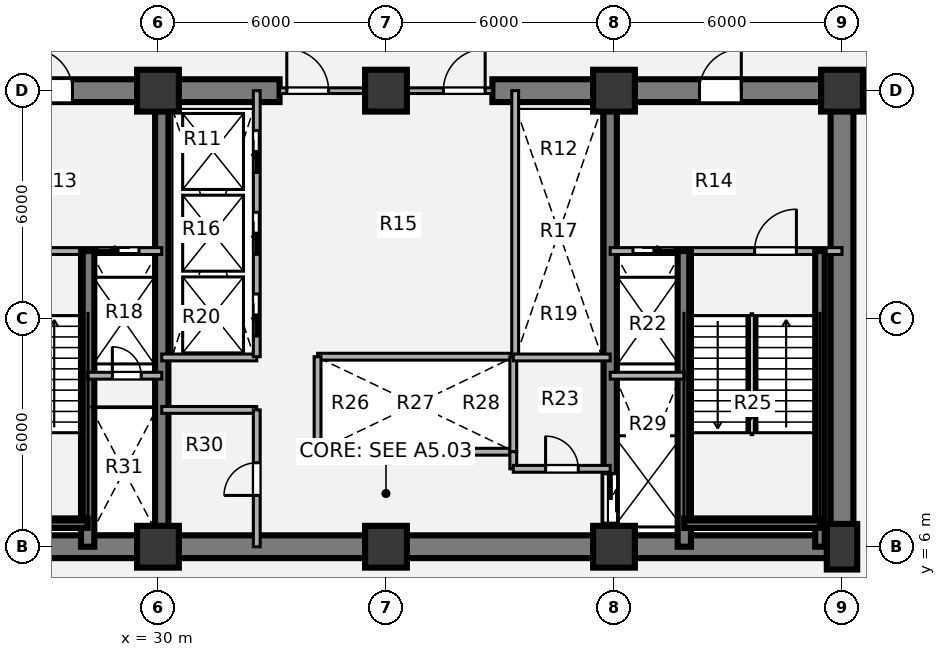
"""IFC4 building model, lengths in metres.
Left out: names, types, materials, properties, quantities, classifications, styles, units other than length and angle.
Written with IfcOpenShell. Run it as: python <this file> out.ifc"""

import sys

from ifc_helpers import new_model, si_unit, direction, frame, frame_2d, origin, origin_2d, place, context, subcontext, project, spatial, rectangle, extrude, source, transform, mapped, element, fill, save


model = new_model("IFC4")
c1 = context("Model", 3, precision=1e-05, world=origin(), true_north=direction((0.0, 1.0)))
c2 = subcontext(c1, "Body", "Model", "MODEL_VIEW")
j1 = project(units=[si_unit("LENGTHUNIT", "METRE"), si_unit("PLANEANGLEUNIT", "RADIAN")], contexts=[c1])
p1 = place(None, origin())
s1 = spatial("IfcSite", under=j1, at=p1, CompositionType="ELEMENT")
p2 = place(p1, origin())
s2 = spatial("IfcBuilding", under=s1, at=p2, CompositionType="ELEMENT")
p3 = place(p2, frame((0.0, 0.0, 14.04)))
s3 = spatial("IfcBuildingStorey", under=s2, at=p3, CompositionType="ELEMENT", Elevation=14.04)
m1 = source(origin(), c2, "Body", "SweptSolid", [
    extrude(rectangle(XDim=1.1, YDim=1.1, at=origin_2d()), origin(), (0.0, 0.0, 1.0), 4.32),
])
for number, where, z_axis, x_axis in (
    (1, (30.0, 6.0, 0.0), (0.0, 0.0, 1.0), (1.0, 0.0, 0.0)),
    (2, (36.0, 6.0, 0.0), (0.0, 0.0, 1.0), (1.0, 0.0, 0.0)),
    (3, (42.0, 6.0, 0.0), (0.0, 0.0, 1.0), (1.0, 0.0, 0.0)),
):
    element("IfcColumn", number, at=place(p3, frame(where, z_axis=z_axis, x_axis=x_axis)), inside=s3, PredefinedType="COLUMN", context=c2, shape_type="MappedRepresentation", body=[
        mapped(m1, transform((0.0, 0.0, 0.0), x_axis=(1.0, 0.0, 0.0), y_axis=(0.0, 1.0, 0.0), z_axis=(0.0, 0.0, 1.0), scale=1.0)),
    ])
m2 = source(origin(), c2, "Body", "SweptSolid", [
    extrude(rectangle(XDim=0.8, YDim=1.2, at=origin_2d()), origin(), (0.0, 0.0, 1.0), 4.32),
])
p4 = place(p3, frame((48.0, 6.0, 0.0), z_axis=(0.0, 0.0, 1.0), x_axis=(1.0, 0.0, 0.0)))
e4 = element("IfcColumn", 4, at=p4, inside=s3, PredefinedType="COLUMN", context=c2, shape_type="MappedRepresentation", body=[
    mapped(m2, transform((0.0, 0.0, 0.0), x_axis=(1.0, 0.0, 0.0), y_axis=(0.0, 1.0, 0.0), z_axis=(0.0, 0.0, 1.0), scale=1.0)),
])
for number, where, z_axis, x_axis in (
    (5, (30.0, 18.0, 0.0), (0.0, 0.0, 1.0), (1.0, 0.0, 0.0)),
    (6, (36.0, 18.0, 0.0), (0.0, 0.0, 1.0), (1.0, 0.0, 0.0)),
    (7, (42.0, 18.0, 0.0), (0.0, 0.0, 1.0), (1.0, 0.0, 0.0)),
    (8, (48.0, 18.0, 0.0), (0.0, 0.0, 1.0), (1.0, 0.0, 0.0)),
):
    element("IfcColumn", number, at=place(p3, frame(where, z_axis=z_axis, x_axis=x_axis)), inside=s3, PredefinedType="COLUMN", context=c2, shape_type="MappedRepresentation", body=[
        mapped(m1, transform((0.0, 0.0, 0.0), x_axis=(1.0, 0.0, 0.0), y_axis=(0.0, 1.0, 0.0), z_axis=(0.0, 0.0, 1.0), scale=1.0)),
    ])
p5 = place(p3, frame((48.3, 6.0, 0.0), z_axis=(0.0, 0.0, 1.0), x_axis=(-1.0, 0.0, 0.0)))
e9 = element("IfcWall", 9, at=p5, inside=s3, PredefinedType="SHEAR", context=c2, shape_type="SweptSolid", body=[
    extrude(rectangle(XDim=24.6, YDim=0.6, at=frame_2d((12.3, 0.0))), origin(), (0.0, 0.0, 1.0), 4.32),
])
p6 = place(p3, frame((48.0, 18.0, 0.0), z_axis=(0.0, 0.0, 1.0), x_axis=(0.0, -1.0, 0.0)))
e10 = element("IfcWall", 10, at=p6, inside=s3, PredefinedType="SHEAR", context=c2, shape_type="SweptSolid", body=[
    extrude(rectangle(XDim=12.0, YDim=0.6, at=frame_2d((6.0, 0.0))), origin(), (0.0, 0.0, 1.0), 4.32),
])
p7 = place(p3, frame((23.7, 18.0, 0.0), z_axis=(0.0, 0.0, 1.0), x_axis=(1.0, 0.0, 0.0)))
e11 = element("IfcWall", 11, at=p7, inside=s3, PredefinedType="SHEAR", context=c2, shape_type="SweptSolid", body=[
    extrude(rectangle(XDim=9.5, YDim=0.6, at=frame_2d((4.75, 0.0))), origin(), (0.0, 0.0, 1.0), 4.32),
])
p8 = place(p7, frame((2.95, 0.0, 0.0)))
e12 = element("IfcOpeningElement", 12, at=p8, cuts=e11, PredefinedType="OPENING", context=c2, shape_type="SweptSolid", body=[
    extrude(rectangle(XDim=1.1, YDim=2.1, at=origin_2d()), frame((0.55, 0.31, 1.05), z_axis=(0.0, -1.0, 0.0), x_axis=(1.0, 0.0, 0.0)), (0.0, 0.0, 1.0), 0.62),
])
p9 = place(p3, frame((38.8, 18.0, 0.0), z_axis=(0.0, 0.0, 1.0), x_axis=(1.0, 0.0, 0.0)))
e13 = element("IfcWall", 13, at=p9, inside=s3, PredefinedType="SHEAR", context=c2, shape_type="SweptSolid", body=[
    extrude(rectangle(XDim=9.5, YDim=0.6, at=frame_2d((4.75, 0.0))), origin(), (0.0, 0.0, 1.0), 4.32),
])
p10 = place(p9, frame((5.45, 0.0, 0.0)))
e14 = element("IfcOpeningElement", 14, at=p10, cuts=e13, PredefinedType="OPENING", context=c2, shape_type="SweptSolid", body=[
    extrude(rectangle(XDim=1.1, YDim=2.1, at=origin_2d()), frame((0.55, 0.31, 1.05), z_axis=(0.0, -1.0, 0.0), x_axis=(1.0, 0.0, 0.0)), (0.0, 0.0, 1.0), 0.62),
])
p11 = place(p3, frame((30.1, 6.0, 0.0), z_axis=(0.0, 0.0, 1.0), x_axis=(0.0, 1.0, 0.0)))
e15 = element("IfcWall", 15, at=p11, inside=s3, PredefinedType="SHEAR", context=c2, shape_type="SweptSolid", body=[
    extrude(rectangle(XDim=12.0, YDim=0.35, at=frame_2d((6.0, 0.0))), origin(), (0.0, 0.0, 1.0), 4.32),
])
p12 = place(p3, frame((41.9, 18.0, 0.0), z_axis=(0.0, 0.0, 1.0), x_axis=(0.0, -1.0, 0.0)))
e16 = element("IfcWall", 16, at=p12, inside=s3, PredefinedType="SHEAR", context=c2, shape_type="SweptSolid", body=[
    extrude(rectangle(XDim=12.0, YDim=0.35, at=frame_2d((6.0, 0.0))), origin(), (0.0, 0.0, 1.0), 4.32),
])
p13 = place(p12, frame((10.08, 0.0, 0.0)))
e17 = element("IfcOpeningElement", 17, at=p13, cuts=e16, PredefinedType="OPENING", context=c2, shape_type="SweptSolid", body=[
    extrude(rectangle(XDim=1.3, YDim=2.1, at=origin_2d()), frame((0.65, 0.185, 1.05), z_axis=(0.0, -1.0, 0.0), x_axis=(1.0, 0.0, 0.0)), (0.0, 0.0, 1.0), 0.37),
])
for number, where, z_axis, x_axis in (
    (18, (34.2, 11.0, 0.0), (0.0, 0.0, 1.0), (1.0, 0.0, 0.0)),
    (19, (34.2, 8.5, 0.0), (0.0, 0.0, 1.0), (1.0, 0.0, 0.0)),
):
    element("IfcWall", number, at=place(p3, frame(where, z_axis=z_axis, x_axis=x_axis)), inside=s3, PredefinedType="PARTITIONING", context=c2, shape_type="SweptSolid", body=[
        extrude(rectangle(XDim=5.15, YDim=0.18, at=frame_2d((2.575, 0.0))), origin(), (0.0, 0.0, 1.0), 4.01),
    ])
for number, where, z_axis, x_axis in (
    (20, (34.2, 8.5, 0.0), (0.0, 0.0, 1.0), (0.0, 1.0, 0.0)),
    (21, (39.35, 8.5, 0.0), (0.0, 0.0, 1.0), (0.0, 1.0, 0.0)),
):
    element("IfcWall", number, at=place(p3, frame(where, z_axis=z_axis, x_axis=x_axis)), inside=s3, PredefinedType="PARTITIONING", context=c2, shape_type="SweptSolid", body=[
        extrude(rectangle(XDim=2.5, YDim=0.18, at=frame_2d((1.25, 0.0))), origin(), (0.0, 0.0, 1.0), 4.01),
    ])
p14 = place(p3, frame((39.4, 11.0, 0.0), z_axis=(0.0, 0.0, 1.0), x_axis=(0.0, 1.0, 0.0)))
e22 = element("IfcWall", 22, at=p14, inside=s3, PredefinedType="PARTITIONING", context=c2, shape_type="SweptSolid", body=[
    extrude(rectangle(XDim=7.0, YDim=0.18, at=frame_2d((3.5, 0.0))), origin(), (0.0, 0.0, 1.0), 4.01),
])
for number, where, z_axis, x_axis in (
    (23, (30.1, 10.98, 0.0), (0.0, 0.0, 1.0), (1.0, 0.0, 0.0)),
    (24, (30.1, 9.6, 0.0), (0.0, 0.0, 1.0), (1.0, 0.0, 0.0)),
):
    element("IfcWall", number, at=place(p3, frame(where, z_axis=z_axis, x_axis=x_axis)), inside=s3, PredefinedType="PARTITIONING", context=c2, shape_type="SweptSolid", body=[
        extrude(rectangle(XDim=2.5, YDim=0.18, at=frame_2d((1.25, 0.0))), origin(), (0.0, 0.0, 1.0), 4.01),
    ])
p15 = place(p3, frame((32.6, 6.0, 0.0), z_axis=(0.0, 0.0, 1.0), x_axis=(0.0, 1.0, 0.0)))
e25 = element("IfcWall", 25, at=p15, inside=s3, PredefinedType="PARTITIONING", context=c2, shape_type="SweptSolid", body=[
    extrude(rectangle(XDim=3.6, YDim=0.18, at=frame_2d((1.8, 0.0))), origin(), (0.0, 0.0, 1.0), 4.01),
])
p16 = place(p15, frame((1.35, 0.0, 0.0)))
e26 = element("IfcOpeningElement", 26, at=p16, cuts=e25, PredefinedType="OPENING", context=c2, shape_type="SweptSolid", body=[
    extrude(rectangle(XDim=0.86, YDim=2.1, at=origin_2d()), frame((0.43, 0.1, 1.05), z_axis=(0.0, -1.0, 0.0), x_axis=(1.0, 0.0, 0.0)), (0.0, 0.0, 1.0), 0.2),
])
p17 = place(p3, frame((39.35, 10.98, 0.0), z_axis=(0.0, 0.0, 1.0), x_axis=(1.0, 0.0, 0.0)))
e27 = element("IfcWall", 27, at=p17, inside=s3, PredefinedType="PARTITIONING", context=c2, shape_type="SweptSolid", body=[
    extrude(rectangle(XDim=2.55, YDim=0.18, at=frame_2d((1.275, 0.0))), origin(), (0.0, 0.0, 1.0), 4.01),
])
p18 = place(p3, frame((39.35, 8.05, 0.0), z_axis=(0.0, 0.0, 1.0), x_axis=(0.0, 1.0, 0.0)))
e28 = element("IfcWall", 28, at=p18, inside=s3, PredefinedType="PARTITIONING", context=c2, shape_type="SweptSolid", body=[
    extrude(rectangle(XDim=0.45, YDim=0.18, at=frame_2d((0.225, 0.0))), origin(), (0.0, 0.0, 1.0), 4.01),
])
p19 = place(p3, frame((39.35, 8.05, 0.0), z_axis=(0.0, 0.0, 1.0), x_axis=(1.0, 0.0, 0.0)))
e29 = element("IfcWall", 29, at=p19, inside=s3, PredefinedType="PARTITIONING", context=c2, shape_type="SweptSolid", body=[
    extrude(rectangle(XDim=2.55, YDim=0.18, at=frame_2d((1.275, 0.0))), origin(), (0.0, 0.0, 1.0), 4.01),
])
p20 = place(p19, frame((0.85, 0.0, 0.0)))
e30 = element("IfcOpeningElement", 30, at=p20, cuts=e29, PredefinedType="OPENING", context=c2, shape_type="SweptSolid", body=[
    extrude(rectangle(XDim=0.86, YDim=2.1, at=origin_2d()), frame((0.43, 0.1, 1.05), z_axis=(0.0, -1.0, 0.0), x_axis=(1.0, 0.0, 0.0)), (0.0, 0.0, 1.0), 0.2),
])
p21 = place(p3, frame((33.2, 18.0, 0.0), z_axis=(0.0, 0.0, 1.0), x_axis=(1.0, 0.0, 0.0)))
e31 = element("IfcWall", 31, at=p21, inside=s3, PredefinedType="PARTITIONING", context=c2, shape_type="SweptSolid", body=[
    extrude(rectangle(XDim=5.6, YDim=0.15, at=frame_2d((2.8, 0.0))), origin(), (0.0, 0.0, 1.0), 2.825),
])
p22 = place(p21, frame((0.19, 0.0, 0.0)))
e32 = element("IfcOpeningElement", 32, at=p22, cuts=e31, PredefinedType="OPENING", context=c2, shape_type="SweptSolid", body=[
    extrude(rectangle(XDim=1.1, YDim=2.1, at=origin_2d()), frame((0.55, 0.085, 1.05), z_axis=(0.0, -1.0, 0.0), x_axis=(1.0, 0.0, 0.0)), (0.0, 0.0, 1.0), 0.17),
])
p23 = place(p21, frame((4.31, 0.0, 0.0)))
e33 = element("IfcOpeningElement", 33, at=p23, cuts=e31, PredefinedType="OPENING", context=c2, shape_type="SweptSolid", body=[
    extrude(rectangle(XDim=1.1, YDim=2.1, at=origin_2d()), frame((0.55, 0.085, 1.05), z_axis=(0.0, -1.0, 0.0), x_axis=(1.0, 0.0, 0.0)), (0.0, 0.0, 1.0), 0.17),
])
p24 = place(p3, frame((24.0, 13.78, 0.0), z_axis=(0.0, 0.0, 1.0), x_axis=(1.0, 0.0, 0.0)))
e34 = element("IfcWall", 34, at=p24, inside=s3, PredefinedType="PARTITIONING", context=c2, shape_type="SweptSolid", body=[
    extrude(rectangle(XDim=6.1, YDim=0.18, at=frame_2d((3.05, 0.0))), origin(), (0.0, 0.0, 1.0), 4.01),
])
p25 = place(p24, frame((1.15, 0.0, 0.0)))
e35 = element("IfcOpeningElement", 35, at=p25, cuts=e34, PredefinedType="OPENING", context=c2, shape_type="SweptSolid", body=[
    extrude(rectangle(XDim=1.1, YDim=2.1, at=origin_2d()), frame((0.55, 0.1, 1.05), z_axis=(0.0, -1.0, 0.0), x_axis=(1.0, 0.0, 0.0)), (0.0, 0.0, 1.0), 0.2),
])
p26 = place(p24, frame((4.4, 0.0, 0.0)))
e36 = element("IfcOpeningElement", 36, at=p26, cuts=e34, PredefinedType="OPENING", context=c2, shape_type="SweptSolid", body=[
    extrude(rectangle(XDim=1.1, YDim=2.1, at=origin_2d()), frame((0.55, 0.1, 1.05), z_axis=(0.0, -1.0, 0.0), x_axis=(1.0, 0.0, 0.0)), (0.0, 0.0, 1.0), 0.2),
])
p27 = place(p3, frame((28.15, 6.0, 0.0), z_axis=(0.0, 0.0, 1.0), x_axis=(0.0, 1.0, 0.0)))
e37 = element("IfcWall", 37, at=p27, inside=s3, PredefinedType="SHEAR", context=c2, shape_type="SweptSolid", body=[
    extrude(rectangle(XDim=7.78, YDim=0.35, at=frame_2d((3.89, 0.0))), origin(), (0.0, 0.0, 1.0), 4.36),
])
p28 = place(p3, frame((24.58, 6.62, 0.0), z_axis=(0.0, 0.0, 1.0), x_axis=(1.0, 0.0, 0.0)))
e38 = element("IfcWall", 38, at=p28, inside=s3, PredefinedType="SHEAR", context=c2, shape_type="SweptSolid", body=[
    extrude(rectangle(XDim=3.57, YDim=0.25, at=frame_2d((1.785, 0.0))), origin(), (0.0, 0.0, 1.0), 4.36),
])
p29 = place(p3, frame((28.15, 10.5, 0.0), z_axis=(0.0, 0.0, 1.0), x_axis=(1.0, 0.0, 0.0)))
e39 = element("IfcWall", 39, at=p29, inside=s3, PredefinedType="PARTITIONING", context=c2, shape_type="SweptSolid", body=[
    extrude(rectangle(XDim=1.95, YDim=0.18, at=frame_2d((0.975, 0.0))), origin(), (0.0, 0.0, 1.0), 4.01),
])
p30 = place(p29, frame((0.65, 0.0, 0.0)))
e40 = element("IfcOpeningElement", 40, at=p30, cuts=e39, PredefinedType="OPENING", context=c2, shape_type="SweptSolid", body=[
    extrude(rectangle(XDim=0.76, YDim=2.05, at=origin_2d()), frame((0.38, 0.1, 1.025), z_axis=(0.0, -1.0, 0.0), x_axis=(1.0, 0.0, 0.0)), (0.0, 0.0, 1.0), 0.2),
])
p31 = place(p3, frame((41.9, 13.78, 0.0), z_axis=(0.0, 0.0, 1.0), x_axis=(1.0, 0.0, 0.0)))
e41 = element("IfcWall", 41, at=p31, inside=s3, PredefinedType="PARTITIONING", context=c2, shape_type="SweptSolid", body=[
    extrude(rectangle(XDim=6.1, YDim=0.18, at=frame_2d((3.05, 0.0))), origin(), (0.0, 0.0, 1.0), 4.01),
])
p32 = place(p31, frame((0.6, 0.0, 0.0)))
e42 = element("IfcOpeningElement", 42, at=p32, cuts=e41, PredefinedType="OPENING", context=c2, shape_type="SweptSolid", body=[
    extrude(rectangle(XDim=1.1, YDim=2.1, at=origin_2d()), frame((0.55, 0.1, 1.05), z_axis=(0.0, -1.0, 0.0), x_axis=(1.0, 0.0, 0.0)), (0.0, 0.0, 1.0), 0.2),
])
p33 = place(p31, frame((3.8, 0.0, 0.0)))
e43 = element("IfcOpeningElement", 43, at=p33, cuts=e41, PredefinedType="OPENING", context=c2, shape_type="SweptSolid", body=[
    extrude(rectangle(XDim=1.1, YDim=2.1, at=origin_2d()), frame((0.55, 0.1, 1.05), z_axis=(0.0, -1.0, 0.0), x_axis=(1.0, 0.0, 0.0)), (0.0, 0.0, 1.0), 0.2),
])
p34 = place(p3, frame((43.85, 6.0, 0.0), z_axis=(0.0, 0.0, 1.0), x_axis=(0.0, 1.0, 0.0)))
e44 = element("IfcWall", 44, at=p34, inside=s3, PredefinedType="SHEAR", context=c2, shape_type="SweptSolid", body=[
    extrude(rectangle(XDim=7.78, YDim=0.35, at=frame_2d((3.89, 0.0))), origin(), (0.0, 0.0, 1.0), 4.36),
])
p35 = place(p3, frame((47.42, 6.0, 0.0), z_axis=(0.0, 0.0, 1.0), x_axis=(0.0, 1.0, 0.0)))
e45 = element("IfcWall", 45, at=p35, inside=s3, PredefinedType="SHEAR", context=c2, shape_type="SweptSolid", body=[
    extrude(rectangle(XDim=7.78, YDim=0.25, at=frame_2d((3.89, 0.0))), origin(), (0.0, 0.0, 1.0), 4.36),
])
p36 = place(p3, frame((43.85, 6.62, 0.0), z_axis=(0.0, 0.0, 1.0), x_axis=(1.0, 0.0, 0.0)))
e46 = element("IfcWall", 46, at=p36, inside=s3, PredefinedType="SHEAR", context=c2, shape_type="SweptSolid", body=[
    extrude(rectangle(XDim=3.57, YDim=0.25, at=frame_2d((1.785, 0.0))), origin(), (0.0, 0.0, 1.0), 4.36),
])
p37 = place(p3, frame((41.9, 10.5, 0.0), z_axis=(0.0, 0.0, 1.0), x_axis=(1.0, 0.0, 0.0)))
e47 = element("IfcWall", 47, at=p37, inside=s3, PredefinedType="PARTITIONING", context=c2, shape_type="SweptSolid", body=[
    extrude(rectangle(XDim=1.95, YDim=0.18, at=frame_2d((0.975, 0.0))), origin(), (0.0, 0.0, 1.0), 4.01),
])
p38 = place(p3, frame((32.6, 11.0, 0.0), z_axis=(0.0, 0.0, 1.0), x_axis=(0.0, 1.0, 0.0)))
e48 = element("IfcWall", 48, at=p38, inside=s3, PredefinedType="PARTITIONING", context=c2, shape_type="SweptSolid", body=[
    extrude(rectangle(XDim=7.0, YDim=0.18, at=frame_2d((3.5, 0.0))), origin(), (0.0, 0.0, 1.0), 4.01),
])
p39 = place(p38, frame((0.55, 0.0, 0.0)))
e49 = element("IfcOpeningElement", 49, at=p39, cuts=e48, PredefinedType="OPENING", context=c2, shape_type="SweptSolid", body=[
    extrude(rectangle(XDim=1.1, YDim=2.1, at=origin_2d()), frame((0.55, 0.1, 1.05), z_axis=(0.0, -1.0, 0.0), x_axis=(1.0, 0.0, 0.0)), (0.0, 0.0, 1.0), 0.2),
])
p40 = place(p38, frame((2.7, 0.0, 0.0)))
e50 = element("IfcOpeningElement", 50, at=p40, cuts=e48, PredefinedType="OPENING", context=c2, shape_type="SweptSolid", body=[
    extrude(rectangle(XDim=1.1, YDim=2.1, at=origin_2d()), frame((0.55, 0.1, 1.05), z_axis=(0.0, -1.0, 0.0), x_axis=(1.0, 0.0, 0.0)), (0.0, 0.0, 1.0), 0.2),
])
p41 = place(p38, frame((4.85, 0.0, 0.0)))
e51 = element("IfcOpeningElement", 51, at=p41, cuts=e48, PredefinedType="OPENING", context=c2, shape_type="SweptSolid", body=[
    extrude(rectangle(XDim=1.1, YDim=2.1, at=origin_2d()), frame((0.55, 0.1, 1.05), z_axis=(0.0, -1.0, 0.0), x_axis=(1.0, 0.0, 0.0)), (0.0, 0.0, 1.0), 0.2),
])
m3 = source(origin(), c2, "Body", "SweptSolid", [
    extrude(rectangle(XDim=0.86, YDim=2.1, at=origin_2d()), frame((0.43, 0.025, 1.05), z_axis=(0.0, -1.0, 0.0), x_axis=(1.0, 0.0, 0.0)), (0.0, 0.0, 1.0), 0.05),
])
p42 = place(p16, origin())
e52 = element("IfcDoor", 52, at=p42, inside=s3, OperationType="SINGLE_SWING_LEFT", PredefinedType="DOOR", context=c2, shape_type="MappedRepresentation", body=[
    mapped(m3, transform((0.0, 0.0, 0.0), x_axis=(1.0, 0.0, 0.0), y_axis=(0.0, 1.0, 0.0), z_axis=(0.0, 0.0, 1.0), scale=1.0)),
])
fill(e26, e52)
p43 = place(p20, origin())
e53 = element("IfcDoor", 53, at=p43, inside=s3, OperationType="SINGLE_SWING_LEFT", PredefinedType="DOOR", context=c2, shape_type="MappedRepresentation", body=[
    mapped(m3, transform((0.0, 0.0, 0.0), x_axis=(1.0, 0.0, 0.0), y_axis=(0.0, 1.0, 0.0), z_axis=(0.0, 0.0, 1.0), scale=1.0)),
])
fill(e30, e53)
m4 = source(origin(), c2, "Body", "SweptSolid", [
    extrude(rectangle(XDim=1.1, YDim=2.1, at=origin_2d()), frame((0.55, 0.025, 1.05), z_axis=(0.0, -1.0, 0.0), x_axis=(1.0, 0.0, 0.0)), (0.0, 0.0, 1.0), 0.05),
])
p44 = place(p22, origin())
e54 = element("IfcDoor", 54, at=p44, inside=s3, OperationType="SINGLE_SWING_LEFT", PredefinedType="DOOR", context=c2, shape_type="MappedRepresentation", body=[
    mapped(m4, transform((0.0, 0.0, 0.0), x_axis=(1.0, 0.0, 0.0), y_axis=(0.0, 1.0, 0.0), z_axis=(0.0, 0.0, 1.0), scale=1.0)),
])
fill(e32, e54)
p45 = place(p23, origin())
e55 = element("IfcDoor", 55, at=p45, inside=s3, OperationType="SINGLE_SWING_RIGHT", PredefinedType="DOOR", context=c2, shape_type="MappedRepresentation", body=[
    mapped(m4, transform((0.0, 0.0, 0.0), x_axis=(1.0, 0.0, 0.0), y_axis=(0.0, 1.0, 0.0), z_axis=(0.0, 0.0, 1.0), scale=1.0)),
])
fill(e33, e55)
m5 = source(origin(), c2, "Body", "SweptSolid", [
    extrude(rectangle(XDim=1.1, YDim=2.1, at=origin_2d()), frame((0.55, 0.025, 1.05), z_axis=(0.0, -1.0, 0.0), x_axis=(1.0, 0.0, 0.0)), (0.0, 0.0, 1.0), 0.05),
])
p46 = place(p26, origin())
e56 = element("IfcDoor", 56, at=p46, inside=s3, OperationType="SLIDING_TO_LEFT", PredefinedType="DOOR", context=c2, shape_type="MappedRepresentation", body=[
    mapped(m5, transform((0.0, 0.0, 0.0), x_axis=(1.0, 0.0, 0.0), y_axis=(0.0, 1.0, 0.0), z_axis=(0.0, 0.0, 1.0), scale=1.0)),
])
fill(e36, e56)
m6 = source(origin(), c2, "Body", "SweptSolid", [
    extrude(rectangle(XDim=0.76, YDim=2.05, at=origin_2d()), frame((0.38, 0.025, 1.025), z_axis=(0.0, -1.0, 0.0), x_axis=(1.0, 0.0, 0.0)), (0.0, 0.0, 1.0), 0.05),
])
p47 = place(p30, origin())
e57 = element("IfcDoor", 57, at=p47, inside=s3, OperationType="SINGLE_SWING_LEFT", PredefinedType="DOOR", context=c2, shape_type="MappedRepresentation", body=[
    mapped(m6, transform((0.0, 0.0, 0.0), x_axis=(1.0, 0.0, 0.0), y_axis=(0.0, 1.0, 0.0), z_axis=(0.0, 0.0, 1.0), scale=1.0)),
])
fill(e40, e57)
p48 = place(p32, origin())
e58 = element("IfcDoor", 58, at=p48, inside=s3, OperationType="SLIDING_TO_RIGHT", PredefinedType="DOOR", context=c2, shape_type="MappedRepresentation", body=[
    mapped(m5, transform((0.0, 0.0, 0.0), x_axis=(1.0, 0.0, 0.0), y_axis=(0.0, 1.0, 0.0), z_axis=(0.0, 0.0, 1.0), scale=1.0)),
])
fill(e42, e58)
m7 = source(origin(), c2, "Body", "SweptSolid", [
    extrude(rectangle(XDim=1.1, YDim=2.1, at=origin_2d()), frame((0.55, 0.025, 1.05), z_axis=(0.0, -1.0, 0.0), x_axis=(1.0, 0.0, 0.0)), (0.0, 0.0, 1.0), 0.05),
])
p49 = place(p33, origin())
e59 = element("IfcDoor", 59, at=p49, inside=s3, OperationType="SINGLE_SWING_RIGHT", PredefinedType="DOOR", context=c2, shape_type="MappedRepresentation", body=[
    mapped(m7, transform((0.0, 0.0, 0.0), x_axis=(1.0, 0.0, 0.0), y_axis=(0.0, 1.0, 0.0), z_axis=(0.0, 0.0, 1.0), scale=1.0)),
])
fill(e43, e59)
m8 = source(origin(), c2, "Body", "SweptSolid", [
    extrude(rectangle(XDim=1.3, YDim=2.1, at=origin_2d()), frame((0.65, 0.025, 1.05), z_axis=(0.0, -1.0, 0.0), x_axis=(1.0, 0.0, 0.0)), (0.0, 0.0, 1.0), 0.05),
])
p50 = place(p13, origin())
e60 = element("IfcDoor", 60, at=p50, inside=s3, OperationType="SLIDING_TO_LEFT", PredefinedType="DOOR", context=c2, shape_type="MappedRepresentation", body=[
    mapped(m8, transform((0.0, 0.0, 0.0), x_axis=(1.0, 0.0, 0.0), y_axis=(0.0, 1.0, 0.0), z_axis=(0.0, 0.0, 1.0), scale=1.0)),
])
fill(e17, e60)
p51 = place(p8, origin())
e61 = element("IfcDoor", 61, at=p51, inside=s3, OperationType="SINGLE_SWING_LEFT", PredefinedType="DOOR", context=c2, shape_type="MappedRepresentation", body=[
    mapped(m4, transform((0.0, 0.0, 0.0), x_axis=(1.0, 0.0, 0.0), y_axis=(0.0, 1.0, 0.0), z_axis=(0.0, 0.0, 1.0), scale=1.0)),
])
fill(e12, e61)
p52 = place(p10, origin())
e62 = element("IfcDoor", 62, at=p52, inside=s3, OperationType="SINGLE_SWING_RIGHT", PredefinedType="DOOR", context=c2, shape_type="MappedRepresentation", body=[
    mapped(m4, transform((0.0, 0.0, 0.0), x_axis=(1.0, 0.0, 0.0), y_axis=(0.0, 1.0, 0.0), z_axis=(0.0, 0.0, 1.0), scale=1.0)),
])
fill(e14, e62)
p53 = place(p39, origin())
e63 = element("IfcDoor", 63, at=p53, inside=s3, OperationType="SLIDING_TO_LEFT", PredefinedType="DOOR", context=c2, shape_type="MappedRepresentation", body=[
    mapped(m5, transform((0.0, 0.0, 0.0), x_axis=(1.0, 0.0, 0.0), y_axis=(0.0, 1.0, 0.0), z_axis=(0.0, 0.0, 1.0), scale=1.0)),
])
fill(e49, e63)
p54 = place(p40, origin())
e64 = element("IfcDoor", 64, at=p54, inside=s3, OperationType="SLIDING_TO_LEFT", PredefinedType="DOOR", context=c2, shape_type="MappedRepresentation", body=[
    mapped(m5, transform((0.0, 0.0, 0.0), x_axis=(1.0, 0.0, 0.0), y_axis=(0.0, 1.0, 0.0), z_axis=(0.0, 0.0, 1.0), scale=1.0)),
])
fill(e50, e64)
p55 = place(p41, origin())
e65 = element("IfcDoor", 65, at=p55, inside=s3, OperationType="SLIDING_TO_LEFT", PredefinedType="DOOR", context=c2, shape_type="MappedRepresentation", body=[
    mapped(m5, transform((0.0, 0.0, 0.0), x_axis=(1.0, 0.0, 0.0), y_axis=(0.0, 1.0, 0.0), z_axis=(0.0, 0.0, 1.0), scale=1.0)),
])
fill(e51, e65)
save(model, sys.argv[1])
